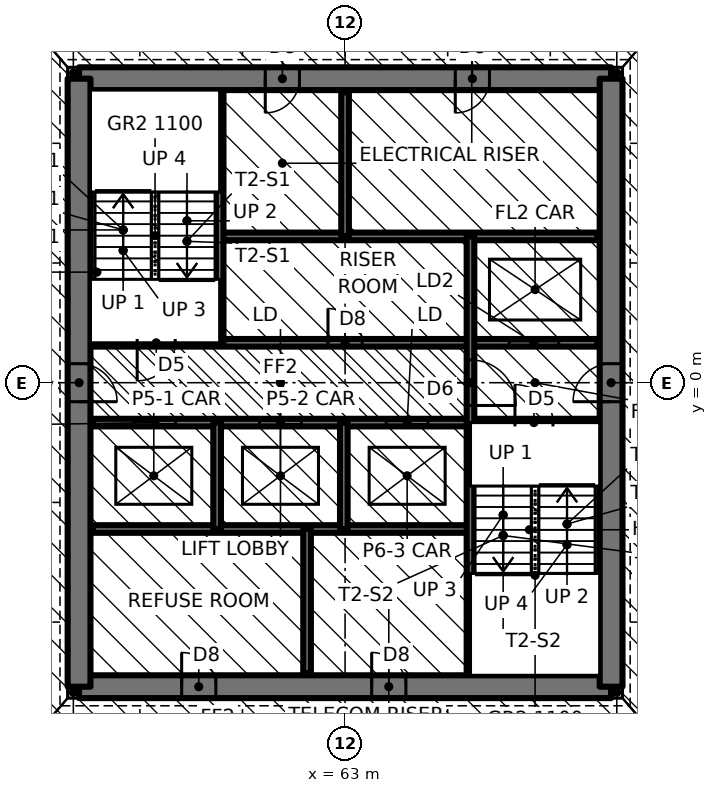
"""IFC4 building model, lengths in metres.
Left out: names, types, materials, properties, quantities, classifications, styles, units other than length and angle.
Written with IfcOpenShell. Run it as: python <this file> out.ifc"""

import sys

from ifc_helpers import new_model, si_unit, direction, frame, frame_2d, origin, place, context, subcontext, project, spatial, rectangle, extrude, element, fill, save


model = new_model("IFC4")
c1 = context("Model", 3, precision=1e-05, world=origin(), true_north=direction((0.0, 1.0)))
c2 = subcontext(c1, "Body", "Model", "MODEL_VIEW")
j1 = project(units=[si_unit("LENGTHUNIT", "METRE"), si_unit("PLANEANGLEUNIT", "RADIAN")], contexts=[c1])
p1 = place(None, origin())
s1 = spatial("IfcSite", under=j1, at=p1, CompositionType="ELEMENT")
p2 = place(p1, origin())
s2 = spatial("IfcBuilding", under=s1, at=p2, CompositionType="ELEMENT")
p3 = place(p2, origin())
s3 = spatial("IfcBuildingStorey", under=s2, at=p3, CompositionType="ELEMENT", Elevation=0.0)
for number, where, z_axis, x_axis in (
    (1, (55.7, -8.15, 0.0), (0.0, 0.0, 1.0), (1.0, 0.0, 0.0)),
    (2, (70.0, -8.15, 0.0), (0.0, 0.0, 1.0), (1.0, 0.0, 0.0)),
    (3, (70.0, 8.15, 0.0), (0.0, 0.0, 1.0), (1.0, 0.0, 0.0)),
    (4, (55.7, 8.15, 0.0), (0.0, 0.0, 1.0), (1.0, 0.0, 0.0)),
):
    element("IfcWall", number, at=place(p3, frame(where, z_axis=z_axis, x_axis=x_axis)), inside=s3, PredefinedType="SOLIDWALL", context=c2, shape_type="SweptSolid", body=[
        extrude(rectangle(XDim=0.3, YDim=0.3, at=frame_2d((0.15, 0.0))), origin(), (0.0, 0.0, 1.0), 6.0),
    ])
p4 = place(p3, frame((56.0, -8.0, 0.0), z_axis=(0.0, 0.0, 1.0), x_axis=(1.0, 0.0, 0.0)))
e5 = element("IfcWall", 5, at=p4, inside=s3, PredefinedType="SHEAR", context=c2, shape_type="SweptSolid", body=[
    extrude(rectangle(XDim=14.0, YDim=0.6, at=frame_2d((7.0, 0.0))), origin(), (0.0, 0.0, 1.0), 6.0),
])
p5 = place(p4, frame((2.7, 0.0, 0.0)))
e6 = element("IfcOpeningElement", 6, at=p5, cuts=e5, PredefinedType="OPENING", context=c2, shape_type="SweptSolid", body=[
    extrude(rectangle(XDim=0.9, YDim=2.1, at=frame_2d((0.45, 1.05))), frame((0.0, 0.31, 0.0), z_axis=(0.0, -1.0, 0.0), x_axis=(1.0, 0.0, 0.0)), (0.0, 0.0, 1.0), 0.62),
])
p6 = place(p4, frame((7.7, 0.0, 0.0)))
e7 = element("IfcOpeningElement", 7, at=p6, cuts=e5, PredefinedType="OPENING", context=c2, shape_type="SweptSolid", body=[
    extrude(rectangle(XDim=0.9, YDim=2.1, at=frame_2d((0.45, 1.05))), frame((0.0, 0.31, 0.0), z_axis=(0.0, -1.0, 0.0), x_axis=(1.0, 0.0, 0.0)), (0.0, 0.0, 1.0), 0.62),
])
p7 = place(p3, frame((70.0, 8.0, 0.0), z_axis=(0.0, 0.0, 1.0), x_axis=(-1.0, 0.0, 0.0)))
e8 = element("IfcWall", 8, at=p7, inside=s3, PredefinedType="SHEAR", context=c2, shape_type="SweptSolid", body=[
    extrude(rectangle(XDim=14.0, YDim=0.6, at=frame_2d((7.0, 0.0))), origin(), (0.0, 0.0, 1.0), 6.0),
])
p8 = place(p7, frame((8.2, 0.0, 0.0)))
e9 = element("IfcOpeningElement", 9, at=p8, cuts=e8, PredefinedType="OPENING", context=c2, shape_type="SweptSolid", body=[
    extrude(rectangle(XDim=0.9, YDim=2.1, at=frame_2d((0.45, 1.05))), frame((0.0, 0.31, 0.0), z_axis=(0.0, -1.0, 0.0), x_axis=(1.0, 0.0, 0.0)), (0.0, 0.0, 1.0), 0.62),
])
p9 = place(p7, frame((3.2, 0.0, 0.0)))
e10 = element("IfcOpeningElement", 10, at=p9, cuts=e8, PredefinedType="OPENING", context=c2, shape_type="SweptSolid", body=[
    extrude(rectangle(XDim=0.9, YDim=2.1, at=frame_2d((0.45, 1.05))), frame((0.0, 0.31, 0.0), z_axis=(0.0, -1.0, 0.0), x_axis=(1.0, 0.0, 0.0)), (0.0, 0.0, 1.0), 0.62),
])
p10 = place(p3, frame((70.0, -8.0, 0.0), z_axis=(0.0, 0.0, 1.0), x_axis=(0.0, 1.0, 0.0)))
e11 = element("IfcWall", 11, at=p10, inside=s3, PredefinedType="SHEAR", context=c2, shape_type="SweptSolid", body=[
    extrude(rectangle(XDim=16.0, YDim=0.6, at=frame_2d((8.0, 0.0))), origin(), (0.0, 0.0, 1.0), 6.0),
])
p11 = place(p10, frame((7.5, 0.0, 0.0)))
e12 = element("IfcOpeningElement", 12, at=p11, cuts=e11, PredefinedType="OPENING", context=c2, shape_type="SweptSolid", body=[
    extrude(rectangle(XDim=1.0, YDim=2.1, at=frame_2d((0.5, 1.05))), frame((0.0, 0.31, 0.0), z_axis=(0.0, -1.0, 0.0), x_axis=(1.0, 0.0, 0.0)), (0.0, 0.0, 1.0), 0.62),
])
p12 = place(p3, frame((56.0, 8.0, 0.0), z_axis=(0.0, 0.0, 1.0), x_axis=(0.0, -1.0, 0.0)))
e13 = element("IfcWall", 13, at=p12, inside=s3, PredefinedType="SHEAR", context=c2, shape_type="SweptSolid", body=[
    extrude(rectangle(XDim=16.0, YDim=0.6, at=frame_2d((8.0, 0.0))), origin(), (0.0, 0.0, 1.0), 6.0),
])
p13 = place(p12, frame((7.5, 0.0, 0.0)))
e14 = element("IfcOpeningElement", 14, at=p13, cuts=e13, PredefinedType="OPENING", context=c2, shape_type="SweptSolid", body=[
    extrude(rectangle(XDim=1.0, YDim=2.1, at=frame_2d((0.5, 1.05))), frame((0.0, 0.31, 0.0), z_axis=(0.0, -1.0, 0.0), x_axis=(1.0, 0.0, 0.0)), (0.0, 0.0, 1.0), 0.62),
])
p14 = place(p3, frame((56.36, -3.85, 0.0), z_axis=(0.0, 0.0, 1.0), x_axis=(1.0, 0.0, 0.0)))
e15 = element("IfcWall", 15, at=p14, inside=s3, PredefinedType="SOLIDWALL", context=c2, shape_type="SweptSolid", body=[
    extrude(rectangle(XDim=9.94, YDim=0.2, at=frame_2d((4.97, 0.0))), origin(), (0.0, 0.0, 1.0), 6.0),
])
p15 = place(p3, frame((56.36, -1.05, 0.0), z_axis=(0.0, 0.0, 1.0), x_axis=(1.0, 0.0, 0.0)))
e16 = element("IfcWall", 16, at=p15, inside=s3, PredefinedType="SOLIDWALL", context=c2, shape_type="SweptSolid", body=[
    extrude(rectangle(XDim=13.28, YDim=0.2, at=frame_2d((6.64, 0.0))), origin(), (0.0, 0.0, 1.0), 6.0),
])
p16 = place(p15, frame((11.11, 0.0, 0.0)))
e17 = element("IfcOpeningElement", 17, at=p16, cuts=e16, PredefinedType="OPENING", context=c2, shape_type="SweptSolid", body=[
    extrude(rectangle(XDim=1.0, YDim=2.1, at=frame_2d((0.5, 1.05))), frame((0.0, 0.11, 0.0), z_axis=(0.0, -1.0, 0.0), x_axis=(1.0, 0.0, 0.0)), (0.0, 0.0, 1.0), 0.22),
])
p17 = place(p15, frame((1.087, 0.0, 0.0)))
e18 = element("IfcOpeningElement", 18, at=p17, cuts=e16, PredefinedType="OPENING", context=c2, shape_type="SweptSolid", body=[
    extrude(rectangle(XDim=1.1, YDim=2.1, at=frame_2d((0.55, 1.05))), frame((0.0, 0.11, 0.0), z_axis=(0.0, -1.0, 0.0), x_axis=(1.0, 0.0, 0.0)), (0.0, 0.0, 1.0), 0.22),
])
p18 = place(p15, frame((4.39, 0.0, 0.0)))
e19 = element("IfcOpeningElement", 19, at=p18, cuts=e16, PredefinedType="OPENING", context=c2, shape_type="SweptSolid", body=[
    extrude(rectangle(XDim=1.1, YDim=2.1, at=frame_2d((0.55, 1.05))), frame((0.0, 0.11, 0.0), z_axis=(0.0, -1.0, 0.0), x_axis=(1.0, 0.0, 0.0)), (0.0, 0.0, 1.0), 0.22),
])
p19 = place(p15, frame((7.724, 0.0, 0.0)))
e20 = element("IfcOpeningElement", 20, at=p19, cuts=e16, PredefinedType="OPENING", context=c2, shape_type="SweptSolid", body=[
    extrude(rectangle(XDim=1.1, YDim=2.1, at=frame_2d((0.55, 1.05))), frame((0.0, 0.11, 0.0), z_axis=(0.0, -1.0, 0.0), x_axis=(1.0, 0.0, 0.0)), (0.0, 0.0, 1.0), 0.22),
])
p20 = place(p3, frame((56.36, 1.05, 0.0), z_axis=(0.0, 0.0, 1.0), x_axis=(1.0, 0.0, 0.0)))
e21 = element("IfcWall", 21, at=p20, inside=s3, PredefinedType="SOLIDWALL", context=c2, shape_type="SweptSolid", body=[
    extrude(rectangle(XDim=13.28, YDim=0.2, at=frame_2d((6.64, 0.0))), origin(), (0.0, 0.0, 1.0), 6.0),
])
p21 = place(p20, frame((1.17, 0.0, 0.0)))
e22 = element("IfcOpeningElement", 22, at=p21, cuts=e21, PredefinedType="OPENING", context=c2, shape_type="SweptSolid", body=[
    extrude(rectangle(XDim=1.0, YDim=2.1, at=frame_2d((0.5, 1.05))), frame((0.0, 0.11, 0.0), z_axis=(0.0, -1.0, 0.0), x_axis=(1.0, 0.0, 0.0)), (0.0, 0.0, 1.0), 0.22),
])
p22 = place(p20, frame((6.19, 0.0, 0.0)))
e23 = element("IfcOpeningElement", 23, at=p22, cuts=e21, PredefinedType="OPENING", context=c2, shape_type="SweptSolid", body=[
    extrude(rectangle(XDim=0.9, YDim=2.1, at=frame_2d((0.45, 1.05))), frame((0.0, 0.11, 0.0), z_axis=(0.0, -1.0, 0.0), x_axis=(1.0, 0.0, 0.0)), (0.0, 0.0, 1.0), 0.22),
])
p23 = place(p20, frame((10.96, 0.0, 0.0)))
e24 = element("IfcOpeningElement", 24, at=p23, cuts=e21, PredefinedType="OPENING", context=c2, shape_type="SweptSolid", body=[
    extrude(rectangle(XDim=1.3, YDim=2.1, at=frame_2d((0.65, 1.05))), frame((0.0, 0.11, 0.0), z_axis=(0.0, -1.0, 0.0), x_axis=(1.0, 0.0, 0.0)), (0.0, 0.0, 1.0), 0.22),
])
p24 = place(p3, frame((59.7, 3.85, 0.0), z_axis=(0.0, 0.0, 1.0), x_axis=(1.0, 0.0, 0.0)))
e25 = element("IfcWall", 25, at=p24, inside=s3, PredefinedType="SOLIDWALL", context=c2, shape_type="SweptSolid", body=[
    extrude(rectangle(XDim=9.94, YDim=0.2, at=frame_2d((4.97, 0.0))), origin(), (0.0, 0.0, 1.0), 6.0),
])
p25 = place(p3, frame((66.3, -7.64, 0.0), z_axis=(0.0, 0.0, 1.0), x_axis=(0.0, 1.0, 0.0)))
e26 = element("IfcWall", 26, at=p25, inside=s3, PredefinedType="SOLIDWALL", context=c2, shape_type="SweptSolid", body=[
    extrude(rectangle(XDim=11.49, YDim=0.2, at=frame_2d((5.745, 0.0))), origin(), (0.0, 0.0, 1.0), 6.0),
])
p26 = place(p25, frame((7.04, 0.0, 0.0)))
e27 = element("IfcOpeningElement", 27, at=p26, cuts=e26, PredefinedType="OPENING", context=c2, shape_type="SweptSolid", body=[
    extrude(rectangle(XDim=1.2, YDim=2.1, at=frame_2d((0.6, 1.05))), frame((0.0, 0.11, 0.0), z_axis=(0.0, -1.0, 0.0), x_axis=(1.0, 0.0, 0.0)), (0.0, 0.0, 1.0), 0.22),
])
p27 = place(p3, frame((63.0, 3.85, 0.0), z_axis=(0.0, 0.0, 1.0), x_axis=(0.0, 1.0, 0.0)))
e28 = element("IfcWall", 28, at=p27, inside=s3, PredefinedType="SOLIDWALL", context=c2, shape_type="SweptSolid", body=[
    extrude(rectangle(XDim=3.79, YDim=0.2, at=frame_2d((1.895, 0.0))), origin(), (0.0, 0.0, 1.0), 6.0),
])
p28 = place(p3, frame((62.967, -3.85, 0.0), z_axis=(0.0, 0.0, 1.0), x_axis=(0.0, 1.0, 0.0)))
e29 = element("IfcWall", 29, at=p28, inside=s3, PredefinedType="SOLIDWALL", context=c2, shape_type="SweptSolid", body=[
    extrude(rectangle(XDim=2.8, YDim=0.2, at=frame_2d((1.4, 0.0))), origin(), (0.0, 0.0, 1.0), 6.0),
])
p29 = place(p3, frame((62.0, -7.64, 0.0), z_axis=(0.0, 0.0, 1.0), x_axis=(0.0, 1.0, 0.0)))
e30 = element("IfcWall", 30, at=p29, inside=s3, PredefinedType="SOLIDWALL", context=c2, shape_type="SweptSolid", body=[
    extrude(rectangle(XDim=3.79, YDim=0.2, at=frame_2d((1.895, 0.0))), origin(), (0.0, 0.0, 1.0), 6.0),
])
p30 = place(p3, frame((59.7, 1.05, 0.0), z_axis=(0.0, 0.0, 1.0), x_axis=(0.0, 1.0, 0.0)))
e31 = element("IfcWall", 31, at=p30, inside=s3, PredefinedType="SOLIDWALL", context=c2, shape_type="SweptSolid", body=[
    extrude(rectangle(XDim=6.59, YDim=0.2, at=frame_2d((3.295, 0.0))), origin(), (0.0, 0.0, 1.0), 6.0),
])
p31 = place(p3, frame((59.633, -3.85, 0.0), z_axis=(0.0, 0.0, 1.0), x_axis=(0.0, 1.0, 0.0)))
e32 = element("IfcWall", 32, at=p31, inside=s3, PredefinedType="SOLIDWALL", context=c2, shape_type="SweptSolid", body=[
    extrude(rectangle(XDim=2.8, YDim=0.2, at=frame_2d((1.4, 0.0))), origin(), (0.0, 0.0, 1.0), 6.0),
])
p32 = place(p21, frame((1.0, 0.0, 0.0), z_axis=(0.0, 0.0, 1.0), x_axis=(-1.0, 0.0, 0.0)))
e33 = element("IfcDoor", 33, at=p32, inside=s3, OperationType="SINGLE_SWING_RIGHT", PredefinedType="DOOR", context=c2, shape_type="SweptSolid", body=[
    extrude(rectangle(XDim=1.0, YDim=2.1, at=frame_2d((0.5, 1.05))), frame((0.0, 0.025, 0.0), z_axis=(0.0, -1.0, 0.0), x_axis=(1.0, 0.0, 0.0)), (0.0, 0.0, 1.0), 0.05),
])
fill(e22, e33)
p33 = place(p16, origin())
e34 = element("IfcDoor", 34, at=p33, inside=s3, OperationType="SINGLE_SWING_LEFT", PredefinedType="DOOR", context=c2, shape_type="SweptSolid", body=[
    extrude(rectangle(XDim=1.0, YDim=2.1, at=frame_2d((0.5, 1.05))), frame((0.0, 0.025, 0.0), z_axis=(0.0, -1.0, 0.0), x_axis=(1.0, 0.0, 0.0)), (0.0, 0.0, 1.0), 0.05),
])
fill(e17, e34)
p34 = place(p26, frame((1.2, 0.0, 0.0), z_axis=(0.0, 0.0, 1.0), x_axis=(-1.0, 0.0, 0.0)))
e35 = element("IfcDoor", 35, at=p34, inside=s3, OperationType="SINGLE_SWING_RIGHT", PredefinedType="DOOR", context=c2, shape_type="SweptSolid", body=[
    extrude(rectangle(XDim=1.2, YDim=2.1, at=frame_2d((0.6, 1.05))), frame((0.0, 0.025, 0.0), z_axis=(0.0, -1.0, 0.0), x_axis=(1.0, 0.0, 0.0)), (0.0, 0.0, 1.0), 0.05),
])
fill(e27, e35)
p35 = place(p22, origin())
e36 = element("IfcDoor", 36, at=p35, inside=s3, OperationType="SINGLE_SWING_LEFT", PredefinedType="DOOR", context=c2, shape_type="SweptSolid", body=[
    extrude(rectangle(XDim=0.9, YDim=2.1, at=frame_2d((0.45, 1.05))), frame((0.0, 0.025, 0.0), z_axis=(0.0, -1.0, 0.0), x_axis=(1.0, 0.0, 0.0)), (0.0, 0.0, 1.0), 0.05),
])
fill(e23, e36)
p36 = place(p13, origin())
e37 = element("IfcDoor", 37, at=p36, inside=s3, OperationType="SINGLE_SWING_RIGHT", PredefinedType="DOOR", context=c2, shape_type="SweptSolid", body=[
    extrude(rectangle(XDim=1.0, YDim=2.1, at=frame_2d((0.5, 1.05))), frame((0.0, 0.025, 0.0), z_axis=(0.0, -1.0, 0.0), x_axis=(1.0, 0.0, 0.0)), (0.0, 0.0, 1.0), 0.05),
])
fill(e14, e37)
p37 = place(p11, origin())
e38 = element("IfcDoor", 38, at=p37, inside=s3, OperationType="SINGLE_SWING_LEFT", PredefinedType="DOOR", context=c2, shape_type="SweptSolid", body=[
    extrude(rectangle(XDim=1.0, YDim=2.1, at=frame_2d((0.5, 1.05))), frame((0.0, 0.025, 0.0), z_axis=(0.0, -1.0, 0.0), x_axis=(1.0, 0.0, 0.0)), (0.0, 0.0, 1.0), 0.05),
])
fill(e12, e38)
p38 = place(p8, origin())
e39 = element("IfcDoor", 39, at=p38, inside=s3, OperationType="SINGLE_SWING_RIGHT", PredefinedType="DOOR", context=c2, shape_type="SweptSolid", body=[
    extrude(rectangle(XDim=0.9, YDim=2.1, at=frame_2d((0.45, 1.05))), frame((0.0, 0.025, 0.0), z_axis=(0.0, -1.0, 0.0), x_axis=(1.0, 0.0, 0.0)), (0.0, 0.0, 1.0), 0.05),
])
fill(e9, e39)
p39 = place(p9, origin())
e40 = element("IfcDoor", 40, at=p39, inside=s3, OperationType="SINGLE_SWING_RIGHT", PredefinedType="DOOR", context=c2, shape_type="SweptSolid", body=[
    extrude(rectangle(XDim=0.9, YDim=2.1, at=frame_2d((0.45, 1.05))), frame((0.0, 0.025, 0.0), z_axis=(0.0, -1.0, 0.0), x_axis=(1.0, 0.0, 0.0)), (0.0, 0.0, 1.0), 0.05),
])
fill(e10, e40)
p40 = place(p5, origin())
e41 = element("IfcDoor", 41, at=p40, inside=s3, OperationType="SINGLE_SWING_LEFT", PredefinedType="DOOR", context=c2, shape_type="SweptSolid", body=[
    extrude(rectangle(XDim=0.9, YDim=2.1, at=frame_2d((0.45, 1.05))), frame((0.0, 0.025, 0.0), z_axis=(0.0, -1.0, 0.0), x_axis=(1.0, 0.0, 0.0)), (0.0, 0.0, 1.0), 0.05),
])
fill(e6, e41)
p41 = place(p6, origin())
e42 = element("IfcDoor", 42, at=p41, inside=s3, OperationType="SINGLE_SWING_LEFT", PredefinedType="DOOR", context=c2, shape_type="SweptSolid", body=[
    extrude(rectangle(XDim=0.9, YDim=2.1, at=frame_2d((0.45, 1.05))), frame((0.0, 0.025, 0.0), z_axis=(0.0, -1.0, 0.0), x_axis=(1.0, 0.0, 0.0)), (0.0, 0.0, 1.0), 0.05),
])
fill(e7, e42)
p42 = place(p17, origin())
e43 = element("IfcDoor", 43, at=p42, inside=s3, OperationType="DOUBLE_DOOR_SLIDING", PredefinedType="DOOR", context=c2, shape_type="SweptSolid", body=[
    extrude(rectangle(XDim=1.1, YDim=2.1, at=frame_2d((0.55, 1.05))), frame((0.0, 0.025, 0.0), z_axis=(0.0, -1.0, 0.0), x_axis=(1.0, 0.0, 0.0)), (0.0, 0.0, 1.0), 0.05),
])
fill(e18, e43)
p43 = place(p18, origin())
e44 = element("IfcDoor", 44, at=p43, inside=s3, OperationType="DOUBLE_DOOR_SLIDING", PredefinedType="DOOR", context=c2, shape_type="SweptSolid", body=[
    extrude(rectangle(XDim=1.1, YDim=2.1, at=frame_2d((0.55, 1.05))), frame((0.0, 0.025, 0.0), z_axis=(0.0, -1.0, 0.0), x_axis=(1.0, 0.0, 0.0)), (0.0, 0.0, 1.0), 0.05),
])
fill(e19, e44)
p44 = place(p19, origin())
e45 = element("IfcDoor", 45, at=p44, inside=s3, OperationType="DOUBLE_DOOR_SLIDING", PredefinedType="DOOR", context=c2, shape_type="SweptSolid", body=[
    extrude(rectangle(XDim=1.1, YDim=2.1, at=frame_2d((0.55, 1.05))), frame((0.0, 0.025, 0.0), z_axis=(0.0, -1.0, 0.0), x_axis=(1.0, 0.0, 0.0)), (0.0, 0.0, 1.0), 0.05),
])
fill(e20, e45)
p45 = place(p23, origin())
e46 = element("IfcDoor", 46, at=p45, inside=s3, OperationType="SLIDING_TO_LEFT", PredefinedType="DOOR", context=c2, shape_type="SweptSolid", body=[
    extrude(rectangle(XDim=1.3, YDim=2.1, at=frame_2d((0.65, 1.05))), frame((0.0, 0.025, 0.0), z_axis=(0.0, -1.0, 0.0), x_axis=(1.0, 0.0, 0.0)), (0.0, 0.0, 1.0), 0.05),
])
fill(e24, e46)
save(model, sys.argv[1])
